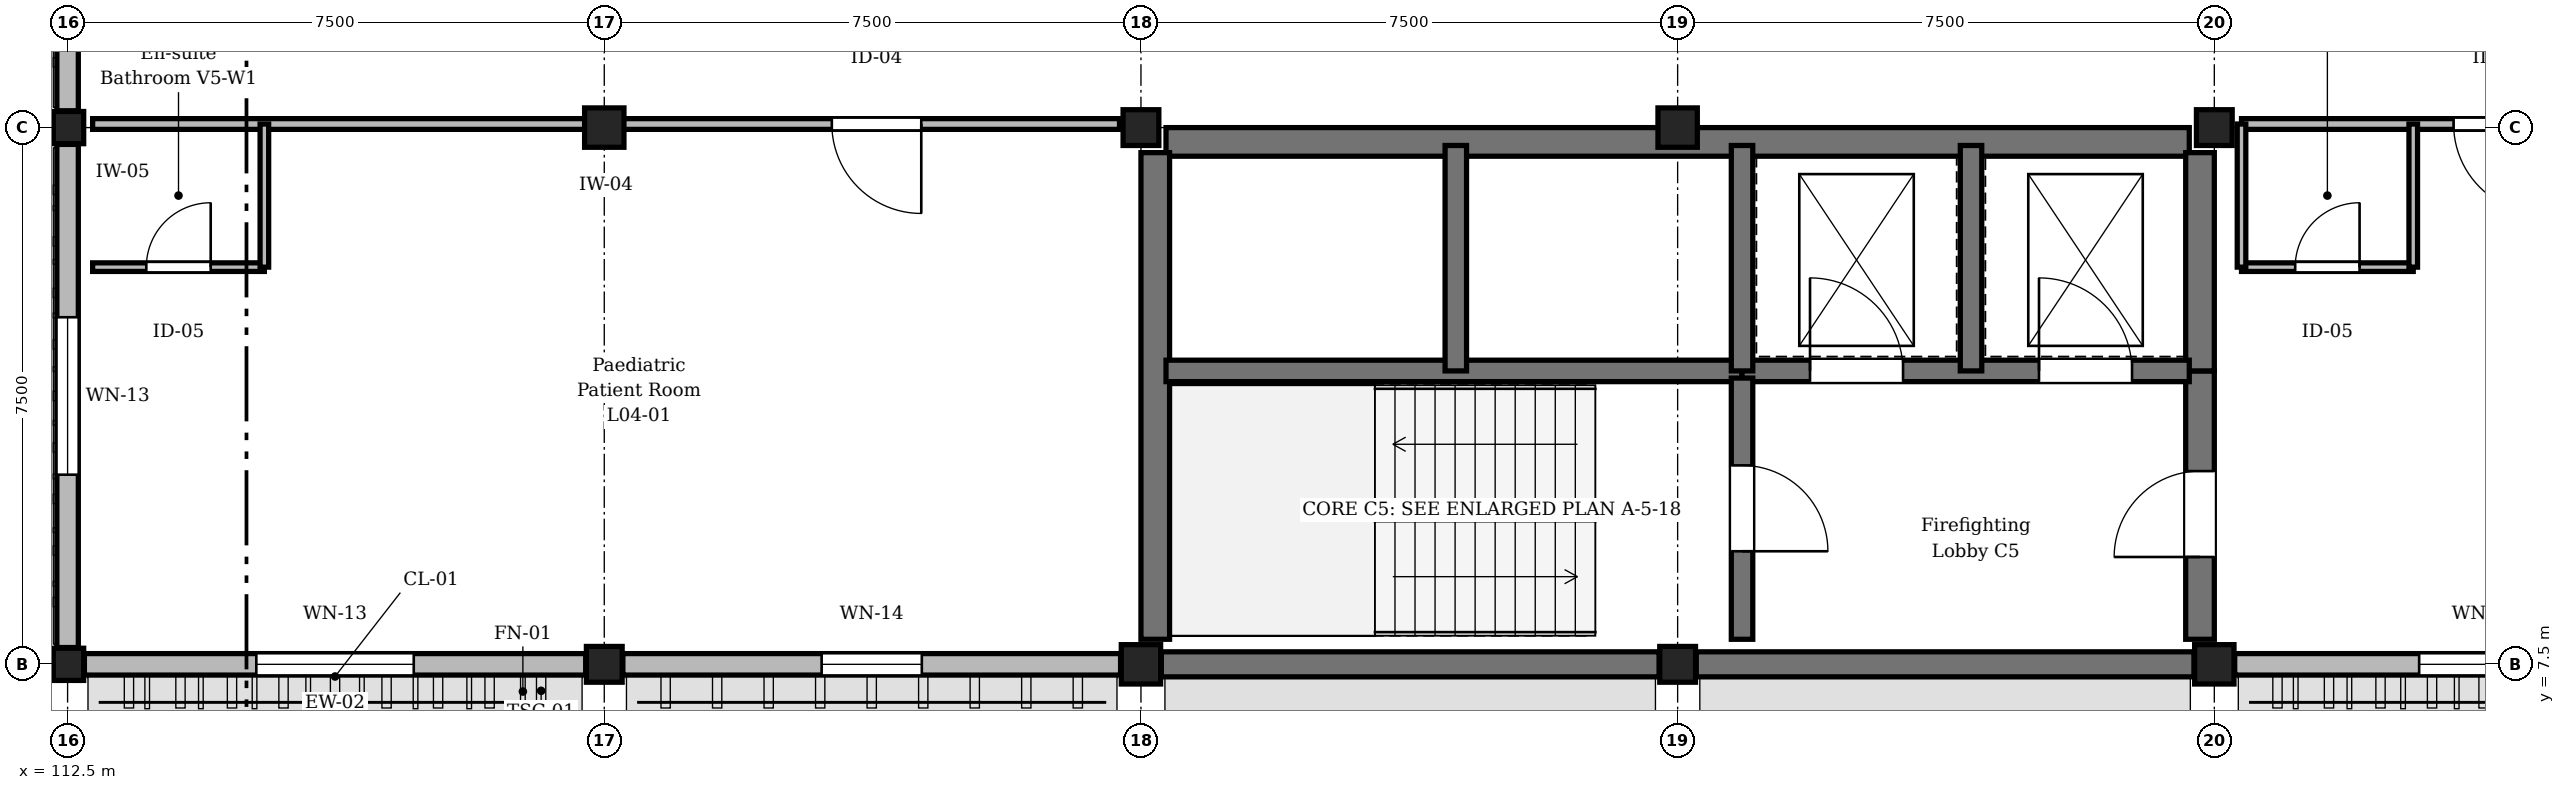
"""IFC4 building model, lengths in metres.
Left out: names, types, materials, properties, quantities, classifications, styles, units other than length and angle.
Written with IfcOpenShell. Run it as: python <this file> out.ifc"""

import sys

from ifc_helpers import new_model, si_unit, direction, frame, frame_2d, origin, origin_2d, place, context, subcontext, project, spatial, rectangle, extrude, element, fill, save


model = new_model("IFC4")
c1 = context("Model", 3, precision=1e-05, world=origin(), true_north=direction((0.0, 1.0)))
c2 = subcontext(c1, "Body", "Model", "MODEL_VIEW")
j1 = project(units=[si_unit("LENGTHUNIT", "METRE"), si_unit("PLANEANGLEUNIT", "RADIAN")], contexts=[c1])
p1 = place(None, origin())
s1 = spatial("IfcSite", under=j1, at=p1, CompositionType="ELEMENT")
p2 = place(p1, origin())
s2 = spatial("IfcBuilding", under=s1, at=p2, CompositionType="ELEMENT")
p3 = place(p2, frame((0.0, 0.0, 17.85)))
s3 = spatial("IfcBuildingStorey", under=s2, at=p3, CompositionType="ELEMENT", Elevation=17.85)
for number, where, z_axis, x_axis in (
    (1, (112.5, 7.5, 0.0), (0.0, 0.0, 1.0), (1.0, 0.0, 0.0)),
    (2, (112.5, 15.0, 0.0), (0.0, 0.0, 1.0), (1.0, 0.0, 0.0)),
):
    element("IfcColumn", number, at=place(p3, frame(where, z_axis=z_axis, x_axis=x_axis)), inside=s3, PredefinedType="COLUMN", context=c2, shape_type="SweptSolid", body=[
        extrude(rectangle(XDim=0.45, YDim=0.45, at=origin_2d()), origin(), (0.0, 0.0, 1.0), 4.05),
    ])
p4 = place(p3, frame((120.0, 7.5, 0.0), z_axis=(0.0, 0.0, 1.0), x_axis=(1.0, 0.0, 0.0)))
e3 = element("IfcColumn", 3, at=p4, inside=s3, PredefinedType="COLUMN", context=c2, shape_type="SweptSolid", body=[
    extrude(rectangle(XDim=0.5, YDim=0.5, at=origin_2d()), origin(), (0.0, 0.0, 1.0), 4.05),
])
for number, where, z_axis, x_axis in (
    (4, (120.0, 15.0, 0.0), (0.0, 0.0, 1.0), (1.0, 0.0, 0.0)),
    (5, (127.5, 7.5, 0.0), (0.0, 0.0, 1.0), (1.0, 0.0, 0.0)),
):
    element("IfcColumn", number, at=place(p3, frame(where, z_axis=z_axis, x_axis=x_axis)), inside=s3, PredefinedType="COLUMN", context=c2, shape_type="SweptSolid", body=[
        extrude(rectangle(XDim=0.55, YDim=0.55, at=origin_2d()), origin(), (0.0, 0.0, 1.0), 4.05),
    ])
for number, where, z_axis, x_axis in (
    (6, (127.5, 15.0, 0.0), (0.0, 0.0, 1.0), (1.0, 0.0, 0.0)),
    (7, (135.0, 7.5, 0.0), (0.0, 0.0, 1.0), (1.0, 0.0, 0.0)),
):
    element("IfcColumn", number, at=place(p3, frame(where, z_axis=z_axis, x_axis=x_axis)), inside=s3, PredefinedType="COLUMN", context=c2, shape_type="SweptSolid", body=[
        extrude(rectangle(XDim=0.5, YDim=0.5, at=origin_2d()), origin(), (0.0, 0.0, 1.0), 4.05),
    ])
for number, where, z_axis, x_axis in (
    (8, (135.0, 15.0, 0.0), (0.0, 0.0, 1.0), (1.0, 0.0, 0.0)),
    (9, (142.5, 7.5, 0.0), (0.0, 0.0, 1.0), (1.0, 0.0, 0.0)),
):
    element("IfcColumn", number, at=place(p3, frame(where, z_axis=z_axis, x_axis=x_axis)), inside=s3, PredefinedType="COLUMN", context=c2, shape_type="SweptSolid", body=[
        extrude(rectangle(XDim=0.55, YDim=0.55, at=origin_2d()), origin(), (0.0, 0.0, 1.0), 4.05),
    ])
p5 = place(p3, frame((142.5, 15.0, 0.0), z_axis=(0.0, 0.0, 1.0), x_axis=(1.0, 0.0, 0.0)))
e10 = element("IfcColumn", 10, at=p5, inside=s3, PredefinedType="COLUMN", context=c2, shape_type="SweptSolid", body=[
    extrude(rectangle(XDim=0.5, YDim=0.5, at=origin_2d()), origin(), (0.0, 0.0, 1.0), 4.05),
])
p6 = place(p3, frame((119.74, 7.5, 0.0), z_axis=(0.0, 0.0, 1.0), x_axis=(-1.0, 0.0, 0.0)))
e11 = element("IfcWall", 11, at=p6, inside=s3, PredefinedType="STANDARD", context=c2, shape_type="SweptSolid", body=[
    extrude(rectangle(XDim=7.005, YDim=0.3, at=frame_2d((3.502, 0.0))), origin(), (0.0, 0.0, 1.0), 3.17),
])
p7 = place(p6, frame((2.403, 0.0, 0.9)))
e12 = element("IfcOpeningElement", 12, at=p7, cuts=e11, PredefinedType="OPENING", context=c2, shape_type="SweptSolid", body=[
    extrude(rectangle(XDim=2.2, YDim=1.95, at=frame_2d((1.1, 0.975))), frame((0.0, 0.16, 0.0), z_axis=(0.0, -1.0, 0.0), x_axis=(1.0, 0.0, 0.0)), (0.0, 0.0, 1.0), 0.32),
])
p8 = place(p3, frame((112.5, 7.735, 0.0), z_axis=(0.0, 0.0, 1.0), x_axis=(0.0, 1.0, 0.0)))
e13 = element("IfcWall", 13, at=p8, inside=s3, PredefinedType="STANDARD", context=c2, shape_type="SweptSolid", body=[
    extrude(rectangle(XDim=7.03, YDim=0.3, at=frame_2d((3.515, 0.0))), origin(), (0.0, 0.0, 1.0), 3.17),
])
p9 = place(p8, frame((2.415, 0.0, 0.9)))
e14 = element("IfcOpeningElement", 14, at=p9, cuts=e13, PredefinedType="OPENING", context=c2, shape_type="SweptSolid", body=[
    extrude(rectangle(XDim=2.2, YDim=1.95, at=frame_2d((1.1, 0.975))), frame((0.0, 0.16, 0.0), z_axis=(0.0, -1.0, 0.0), x_axis=(1.0, 0.0, 0.0)), (0.0, 0.0, 1.0), 0.32),
])
p10 = place(p3, frame((112.5, 15.235, 0.0), z_axis=(0.0, 0.0, 1.0), x_axis=(0.0, 1.0, 0.0)))
e15 = element("IfcWall", 15, at=p10, inside=s3, PredefinedType="STANDARD", context=c2, shape_type="SweptSolid", body=[
    extrude(rectangle(XDim=7.115, YDim=0.3, at=frame_2d((3.558, 0.0))), origin(), (0.0, 0.0, 1.0), 3.17),
])
p11 = place(p10, frame((2.857, 0.0, 0.9)))
e16 = element("IfcOpeningElement", 16, at=p11, cuts=e15, PredefinedType="OPENING", context=c2, shape_type="SweptSolid", body=[
    extrude(rectangle(XDim=1.4, YDim=1.8, at=frame_2d((0.7, 0.9))), frame((0.0, 0.16, 0.0), z_axis=(0.0, -1.0, 0.0), x_axis=(1.0, 0.0, 0.0)), (0.0, 0.0, 1.0), 0.32),
])
p12 = place(p3, frame((127.215, 7.5, 0.0), z_axis=(0.0, 0.0, 1.0), x_axis=(-1.0, 0.0, 0.0)))
e17 = element("IfcWall", 17, at=p12, inside=s3, PredefinedType="STANDARD", context=c2, shape_type="SweptSolid", body=[
    extrude(rectangle(XDim=6.955, YDim=0.3, at=frame_2d((3.478, 0.0))), origin(), (0.0, 0.0, 1.0), 3.17),
])
p13 = place(p12, frame((2.778, 0.0, 0.9)))
e18 = element("IfcOpeningElement", 18, at=p13, cuts=e17, PredefinedType="OPENING", context=c2, shape_type="SweptSolid", body=[
    extrude(rectangle(XDim=1.4, YDim=1.8, at=frame_2d((0.7, 0.9))), frame((0.0, 0.16, 0.0), z_axis=(0.0, -1.0, 0.0), x_axis=(1.0, 0.0, 0.0)), (0.0, 0.0, 1.0), 0.32),
])
for number, where, z_axis, x_axis in (
    (19, (134.74, 7.5, 0.0), (0.0, 0.0, 1.0), (-1.0, 0.0, 0.0)),
    (20, (142.215, 7.5, 0.0), (0.0, 0.0, 1.0), (-1.0, 0.0, 0.0)),
):
    element("IfcWall", number, at=place(p3, frame(where, z_axis=z_axis, x_axis=x_axis)), inside=s3, PredefinedType="SHEAR", context=c2, shape_type="SweptSolid", body=[
        extrude(rectangle(XDim=6.955, YDim=0.35, at=frame_2d((3.478, 0.0))), origin(), (0.0, 0.0, 1.0), 3.77),
    ])
p14 = place(p3, frame((149.74, 7.5, 0.0), z_axis=(0.0, 0.0, 1.0), x_axis=(-1.0, 0.0, 0.0)))
e21 = element("IfcWall", 21, at=p14, inside=s3, PredefinedType="STANDARD", context=c2, shape_type="SweptSolid", body=[
    extrude(rectangle(XDim=6.955, YDim=0.3, at=frame_2d((3.478, 0.0))), origin(), (0.0, 0.0, 1.0), 3.17),
])
p15 = place(p14, frame((2.577, 0.0, 0.9)))
e22 = element("IfcOpeningElement", 22, at=p15, cuts=e21, PredefinedType="OPENING", context=c2, shape_type="SweptSolid", body=[
    extrude(rectangle(XDim=1.8, YDim=1.99, at=frame_2d((0.9, 0.995))), frame((0.0, 0.16, 0.0), z_axis=(0.0, -1.0, 0.0), x_axis=(1.0, 0.0, 0.0)), (0.0, 0.0, 1.0), 0.32),
])
p16 = place(p3, frame((127.85, 14.8, 0.0), z_axis=(0.0, 0.0, 1.0), x_axis=(1.0, 0.0, 0.0)))
e23 = element("IfcWall", 23, at=p16, inside=s3, PredefinedType="SHEAR", context=c2, shape_type="SweptSolid", body=[
    extrude(rectangle(XDim=14.3, YDim=0.4, at=frame_2d((7.15, 0.0))), origin(), (0.0, 0.0, 1.0), 3.77),
])
p17 = place(p3, frame((127.7, 7.85, 0.0), z_axis=(0.0, 0.0, 1.0), x_axis=(0.0, 1.0, 0.0)))
e24 = element("IfcWall", 24, at=p17, inside=s3, PredefinedType="SHEAR", context=c2, shape_type="SweptSolid", body=[
    extrude(rectangle(XDim=6.8, YDim=0.4, at=frame_2d((3.4, 0.0))), origin(), (0.0, 0.0, 1.0), 3.77),
])
p18 = place(p3, frame((142.3, 7.85, 0.0), z_axis=(0.0, 0.0, 1.0), x_axis=(0.0, 1.0, 0.0)))
e25 = element("IfcWall", 25, at=p18, inside=s3, PredefinedType="SHEAR", context=c2, shape_type="SweptSolid", body=[
    extrude(rectangle(XDim=3.75, YDim=0.4, at=frame_2d((1.875, 0.0))), origin(), (0.0, 0.0, 1.0), 3.77),
])
p19 = place(p18, frame((1.15, 0.0, 0.0)))
e26 = element("IfcOpeningElement", 26, at=p19, cuts=e25, PredefinedType="OPENING", context=c2, shape_type="SweptSolid", body=[
    extrude(rectangle(XDim=1.2, YDim=2.25, at=frame_2d((0.6, 1.125))), frame((0.0, 0.21, 0.0), z_axis=(0.0, -1.0, 0.0), x_axis=(1.0, 0.0, 0.0)), (0.0, 0.0, 1.0), 0.42),
])
p20 = place(p3, frame((142.3, 11.6, 0.0), z_axis=(0.0, 0.0, 1.0), x_axis=(0.0, 1.0, 0.0)))
e27 = element("IfcWall", 27, at=p20, inside=s3, PredefinedType="SHEAR", context=c2, shape_type="SweptSolid", body=[
    extrude(rectangle(XDim=3.05, YDim=0.4, at=frame_2d((1.525, 0.0))), origin(), (0.0, 0.0, 1.0), 3.77),
])
p21 = place(p3, frame((127.85, 11.6, 0.0), z_axis=(0.0, 0.0, 1.0), x_axis=(1.0, 0.0, 0.0)))
e28 = element("IfcWall", 28, at=p21, inside=s3, PredefinedType="SHEAR", context=c2, shape_type="SweptSolid", body=[
    extrude(rectangle(XDim=8.05, YDim=0.3, at=frame_2d((4.025, 0.0))), origin(), (0.0, 0.0, 1.0), 3.77),
])
p22 = place(p3, frame((135.9, 11.6, 0.0), z_axis=(0.0, 0.0, 1.0), x_axis=(1.0, 0.0, 0.0)))
e29 = element("IfcWall", 29, at=p22, inside=s3, PredefinedType="SHEAR", context=c2, shape_type="SweptSolid", body=[
    extrude(rectangle(XDim=6.25, YDim=0.3, at=frame_2d((3.125, 0.0))), origin(), (0.0, 0.0, 1.0), 3.77),
])
p23 = place(p22, frame((0.95, 0.0, 0.0)))
e30 = element("IfcOpeningElement", 30, at=p23, cuts=e29, PredefinedType="OPENING", context=c2, shape_type="SweptSolid", body=[
    extrude(rectangle(XDim=1.3, YDim=2.2, at=frame_2d((0.65, 1.1))), frame((0.0, 0.16, 0.0), z_axis=(0.0, -1.0, 0.0), x_axis=(1.0, 0.0, 0.0)), (0.0, 0.0, 1.0), 0.32),
])
p24 = place(p22, frame((4.15, 0.0, 0.0)))
e31 = element("IfcOpeningElement", 31, at=p24, cuts=e29, PredefinedType="OPENING", context=c2, shape_type="SweptSolid", body=[
    extrude(rectangle(XDim=1.3, YDim=2.2, at=frame_2d((0.65, 1.1))), frame((0.0, 0.16, 0.0), z_axis=(0.0, -1.0, 0.0), x_axis=(1.0, 0.0, 0.0)), (0.0, 0.0, 1.0), 0.32),
])
p25 = place(p3, frame((135.9, 11.5, 0.0), z_axis=(0.0, 0.0, 1.0), x_axis=(0.0, -1.0, 0.0)))
e32 = element("IfcWall", 32, at=p25, inside=s3, PredefinedType="SHEAR", context=c2, shape_type="SweptSolid", body=[
    extrude(rectangle(XDim=3.65, YDim=0.3, at=frame_2d((1.825, 0.0))), origin(), (0.0, 0.0, 1.0), 3.77),
])
p26 = place(p25, frame((1.22, 0.0, 0.0)))
e33 = element("IfcOpeningElement", 33, at=p26, cuts=e32, PredefinedType="OPENING", context=c2, shape_type="SweptSolid", body=[
    extrude(rectangle(XDim=1.2, YDim=2.25, at=frame_2d((0.6, 1.125))), frame((0.0, 0.16, 0.0), z_axis=(0.0, -1.0, 0.0), x_axis=(1.0, 0.0, 0.0)), (0.0, 0.0, 1.0), 0.32),
])
for number, where, z_axis, x_axis in (
    (34, (131.9, 11.6, 0.0), (0.0, 0.0, 1.0), (0.0, 1.0, 0.0)),
    (35, (135.9, 11.6, 0.0), (0.0, 0.0, 1.0), (0.0, 1.0, 0.0)),
    (36, (139.1, 11.6, 0.0), (0.0, 0.0, 1.0), (0.0, 1.0, 0.0)),
):
    element("IfcWall", number, at=place(p3, frame(where, z_axis=z_axis, x_axis=x_axis)), inside=s3, PredefinedType="SHEAR", context=c2, shape_type="SweptSolid", body=[
        extrude(rectangle(XDim=3.15, YDim=0.3, at=frame_2d((1.575, 0.0))), origin(), (0.0, 0.0, 1.0), 3.77),
    ])
p27 = place(p3, frame((127.2, 15.05, 0.0), z_axis=(0.0, 0.0, 1.0), x_axis=(-1.0, 0.0, 0.0)))
e37 = element("IfcWall", 37, at=p27, inside=s3, PredefinedType="PARTITIONING", context=c2, shape_type="SweptSolid", body=[
    extrude(rectangle(XDim=14.35, YDim=0.15, at=frame_2d((7.175, 0.0))), origin(), (0.0, 0.0, 1.0), 3.155),
])
p28 = place(p27, frame((2.77, 0.0, 0.0)))
e38 = element("IfcOpeningElement", 38, at=p28, cuts=e37, PredefinedType="OPENING", context=c2, shape_type="SweptSolid", body=[
    extrude(rectangle(XDim=1.25, YDim=2.2, at=frame_2d((0.625, 1.1))), frame((0.0, 0.085, 0.0), z_axis=(0.0, -1.0, 0.0), x_axis=(1.0, 0.0, 0.0)), (0.0, 0.0, 1.0), 0.17),
])
p29 = place(p3, frame((112.85, 13.05, 0.0), z_axis=(0.0, 0.0, 1.0), x_axis=(1.0, 0.0, 0.0)))
e39 = element("IfcWall", 39, at=p29, inside=s3, PredefinedType="PARTITIONING", context=c2, shape_type="SweptSolid", body=[
    extrude(rectangle(XDim=2.4, YDim=0.12, at=frame_2d((1.2, 0.0))), origin(), (0.0, 0.0, 1.0), 3.755),
])
p30 = place(p29, frame((0.75, 0.0, 0.0)))
e40 = element("IfcOpeningElement", 40, at=p30, cuts=e39, PredefinedType="OPENING", context=c2, shape_type="SweptSolid", body=[
    extrude(rectangle(XDim=0.9, YDim=2.1, at=frame_2d((0.45, 1.05))), frame((0.0, 0.07, 0.0), z_axis=(0.0, -1.0, 0.0), x_axis=(1.0, 0.0, 0.0)), (0.0, 0.0, 1.0), 0.14),
])
p31 = place(p3, frame((115.25, 13.05, 0.0), z_axis=(0.0, 0.0, 1.0), x_axis=(0.0, 1.0, 0.0)))
e41 = element("IfcWall", 41, at=p31, inside=s3, PredefinedType="PARTITIONING", context=c2, shape_type="SweptSolid", body=[
    extrude(rectangle(XDim=2.0, YDim=0.12, at=frame_2d((1.0, 0.0))), origin(), (0.0, 0.0, 1.0), 3.755),
])
p32 = place(p3, frame((150.058, 15.05, 0.0), z_axis=(0.0, 0.0, 1.0), x_axis=(-1.0, 0.0, 0.0)))
e42 = element("IfcWall", 42, at=p32, inside=s3, PredefinedType="PARTITIONING", context=c2, shape_type="SweptSolid", body=[
    extrude(rectangle(XDim=7.178, YDim=0.15, at=frame_2d((3.589, 0.0))), origin(), (0.0, 0.0, 1.0), 3.205),
])
p33 = place(p32, frame((2.964, 0.0, 0.0)))
e43 = element("IfcOpeningElement", 43, at=p33, cuts=e42, PredefinedType="OPENING", context=c2, shape_type="SweptSolid", body=[
    extrude(rectangle(XDim=1.25, YDim=2.2, at=frame_2d((0.625, 1.1))), frame((0.0, 0.085, 0.0), z_axis=(0.0, -1.0, 0.0), x_axis=(1.0, 0.0, 0.0)), (0.0, 0.0, 1.0), 0.17),
])
p34 = place(p3, frame((142.88, 13.05, 0.0), z_axis=(0.0, 0.0, 1.0), x_axis=(1.0, 0.0, 0.0)))
e44 = element("IfcWall", 44, at=p34, inside=s3, PredefinedType="PARTITIONING", context=c2, shape_type="SweptSolid", body=[
    extrude(rectangle(XDim=2.4, YDim=0.12, at=frame_2d((1.2, 0.0))), origin(), (0.0, 0.0, 1.0), 3.755),
])
p35 = place(p34, frame((0.75, 0.0, 0.0)))
e45 = element("IfcOpeningElement", 45, at=p35, cuts=e44, PredefinedType="OPENING", context=c2, shape_type="SweptSolid", body=[
    extrude(rectangle(XDim=0.9, YDim=2.1, at=frame_2d((0.45, 1.05))), frame((0.0, 0.07, 0.0), z_axis=(0.0, -1.0, 0.0), x_axis=(1.0, 0.0, 0.0)), (0.0, 0.0, 1.0), 0.14),
])
p36 = place(p3, frame((145.28, 13.05, 0.0), z_axis=(0.0, 0.0, 1.0), x_axis=(0.0, 1.0, 0.0)))
e46 = element("IfcWall", 46, at=p36, inside=s3, PredefinedType="PARTITIONING", context=c2, shape_type="SweptSolid", body=[
    extrude(rectangle(XDim=2.0, YDim=0.12, at=frame_2d((1.0, 0.0))), origin(), (0.0, 0.0, 1.0), 3.755),
])
p37 = place(p3, frame((142.88, 13.05, 0.0), z_axis=(0.0, 0.0, 1.0), x_axis=(0.0, 1.0, 0.0)))
e47 = element("IfcWall", 47, at=p37, inside=s3, PredefinedType="PARTITIONING", context=c2, shape_type="SweptSolid", body=[
    extrude(rectangle(XDim=2.0, YDim=0.12, at=frame_2d((1.0, 0.0))), origin(), (0.0, 0.0, 1.0), 3.205),
])
p38 = place(p7, origin())
e48 = element("IfcWindow", 48, at=p38, inside=s3, PartitioningType="SINGLE_PANEL", PredefinedType="WINDOW", context=c2, shape_type="SweptSolid", body=[
    extrude(rectangle(XDim=2.2, YDim=1.95, at=frame_2d((1.1, 0.975))), frame((0.0, 0.03, 0.0), z_axis=(0.0, -1.0, 0.0), x_axis=(1.0, 0.0, 0.0)), (0.0, 0.0, 1.0), 0.06),
])
fill(e12, e48)
p39 = place(p9, origin())
e49 = element("IfcWindow", 49, at=p39, inside=s3, PartitioningType="SINGLE_PANEL", PredefinedType="WINDOW", context=c2, shape_type="SweptSolid", body=[
    extrude(rectangle(XDim=2.2, YDim=1.95, at=frame_2d((1.1, 0.975))), frame((0.0, 0.03, 0.0), z_axis=(0.0, -1.0, 0.0), x_axis=(1.0, 0.0, 0.0)), (0.0, 0.0, 1.0), 0.06),
])
fill(e14, e49)
p40 = place(p13, origin())
e50 = element("IfcWindow", 50, at=p40, inside=s3, PartitioningType="SINGLE_PANEL", PredefinedType="WINDOW", context=c2, shape_type="SweptSolid", body=[
    extrude(rectangle(XDim=1.4, YDim=1.8, at=frame_2d((0.7, 0.9))), frame((0.0, 0.03, 0.0), z_axis=(0.0, -1.0, 0.0), x_axis=(1.0, 0.0, 0.0)), (0.0, 0.0, 1.0), 0.06),
])
fill(e18, e50)
p41 = place(p15, origin())
e51 = element("IfcWindow", 51, at=p41, inside=s3, PartitioningType="SINGLE_PANEL", PredefinedType="WINDOW", context=c2, shape_type="SweptSolid", body=[
    extrude(rectangle(XDim=1.8, YDim=1.99, at=frame_2d((0.9, 0.995))), frame((0.0, 0.03, 0.0), z_axis=(0.0, -1.0, 0.0), x_axis=(1.0, 0.0, 0.0)), (0.0, 0.0, 1.0), 0.06),
])
fill(e22, e51)
p42 = place(p19, origin())
e52 = element("IfcDoor", 52, at=p42, inside=s3, OperationType="SINGLE_SWING_LEFT", PredefinedType="DOOR", context=c2, shape_type="SweptSolid", body=[
    extrude(rectangle(XDim=1.2, YDim=2.25, at=frame_2d((0.6, 1.125))), frame((0.0, 0.025, 0.0), z_axis=(0.0, -1.0, 0.0), x_axis=(1.0, 0.0, 0.0)), (0.0, 0.0, 1.0), 0.05),
])
fill(e26, e52)
p43 = place(p23, origin())
e53 = element("IfcDoor", 53, at=p43, inside=s3, OperationType="DOUBLE_DOOR_SLIDING", PredefinedType="DOOR", context=c2, shape_type="SweptSolid", body=[
    extrude(rectangle(XDim=1.3, YDim=2.2, at=frame_2d((0.65, 1.1))), frame((0.0, 0.025, 0.0), z_axis=(0.0, -1.0, 0.0), x_axis=(1.0, 0.0, 0.0)), (0.0, 0.0, 1.0), 0.05),
])
fill(e30, e53)
p44 = place(p24, origin())
e54 = element("IfcDoor", 54, at=p44, inside=s3, OperationType="DOUBLE_DOOR_SLIDING", PredefinedType="DOOR", context=c2, shape_type="SweptSolid", body=[
    extrude(rectangle(XDim=1.3, YDim=2.2, at=frame_2d((0.65, 1.1))), frame((0.0, 0.025, 0.0), z_axis=(0.0, -1.0, 0.0), x_axis=(1.0, 0.0, 0.0)), (0.0, 0.0, 1.0), 0.05),
])
fill(e31, e54)
p45 = place(p26, origin())
e55 = element("IfcDoor", 55, at=p45, inside=s3, OperationType="SINGLE_SWING_RIGHT", PredefinedType="DOOR", context=c2, shape_type="SweptSolid", body=[
    extrude(rectangle(XDim=1.2, YDim=2.25, at=frame_2d((0.6, 1.125))), frame((0.0, 0.025, 0.0), z_axis=(0.0, -1.0, 0.0), x_axis=(1.0, 0.0, 0.0)), (0.0, 0.0, 1.0), 0.05),
])
fill(e33, e55)
p46 = place(p28, origin())
e56 = element("IfcDoor", 56, at=p46, inside=s3, OperationType="SINGLE_SWING_LEFT", PredefinedType="DOOR", context=c2, shape_type="SweptSolid", body=[
    extrude(rectangle(XDim=1.25, YDim=2.2, at=frame_2d((0.625, 1.1))), frame((0.0, 0.025, 0.0), z_axis=(0.0, -1.0, 0.0), x_axis=(1.0, 0.0, 0.0)), (0.0, 0.0, 1.0), 0.05),
])
fill(e38, e56)
p47 = place(p30, origin())
e57 = element("IfcDoor", 57, at=p47, inside=s3, OperationType="SINGLE_SWING_RIGHT", PredefinedType="DOOR", context=c2, shape_type="SweptSolid", body=[
    extrude(rectangle(XDim=0.9, YDim=2.1, at=frame_2d((0.45, 1.05))), frame((0.0, 0.025, 0.0), z_axis=(0.0, -1.0, 0.0), x_axis=(1.0, 0.0, 0.0)), (0.0, 0.0, 1.0), 0.05),
])
fill(e40, e57)
p48 = place(p33, origin())
e58 = element("IfcDoor", 58, at=p48, inside=s3, OperationType="SINGLE_SWING_LEFT", PredefinedType="DOOR", context=c2, shape_type="SweptSolid", body=[
    extrude(rectangle(XDim=1.25, YDim=2.2, at=frame_2d((0.625, 1.1))), frame((0.0, 0.025, 0.0), z_axis=(0.0, -1.0, 0.0), x_axis=(1.0, 0.0, 0.0)), (0.0, 0.0, 1.0), 0.05),
])
fill(e43, e58)
p49 = place(p35, origin())
e59 = element("IfcDoor", 59, at=p49, inside=s3, OperationType="SINGLE_SWING_RIGHT", PredefinedType="DOOR", context=c2, shape_type="SweptSolid", body=[
    extrude(rectangle(XDim=0.9, YDim=2.1, at=frame_2d((0.45, 1.05))), frame((0.0, 0.025, 0.0), z_axis=(0.0, -1.0, 0.0), x_axis=(1.0, 0.0, 0.0)), (0.0, 0.0, 1.0), 0.05),
])
fill(e45, e59)
save(model, sys.argv[1])
